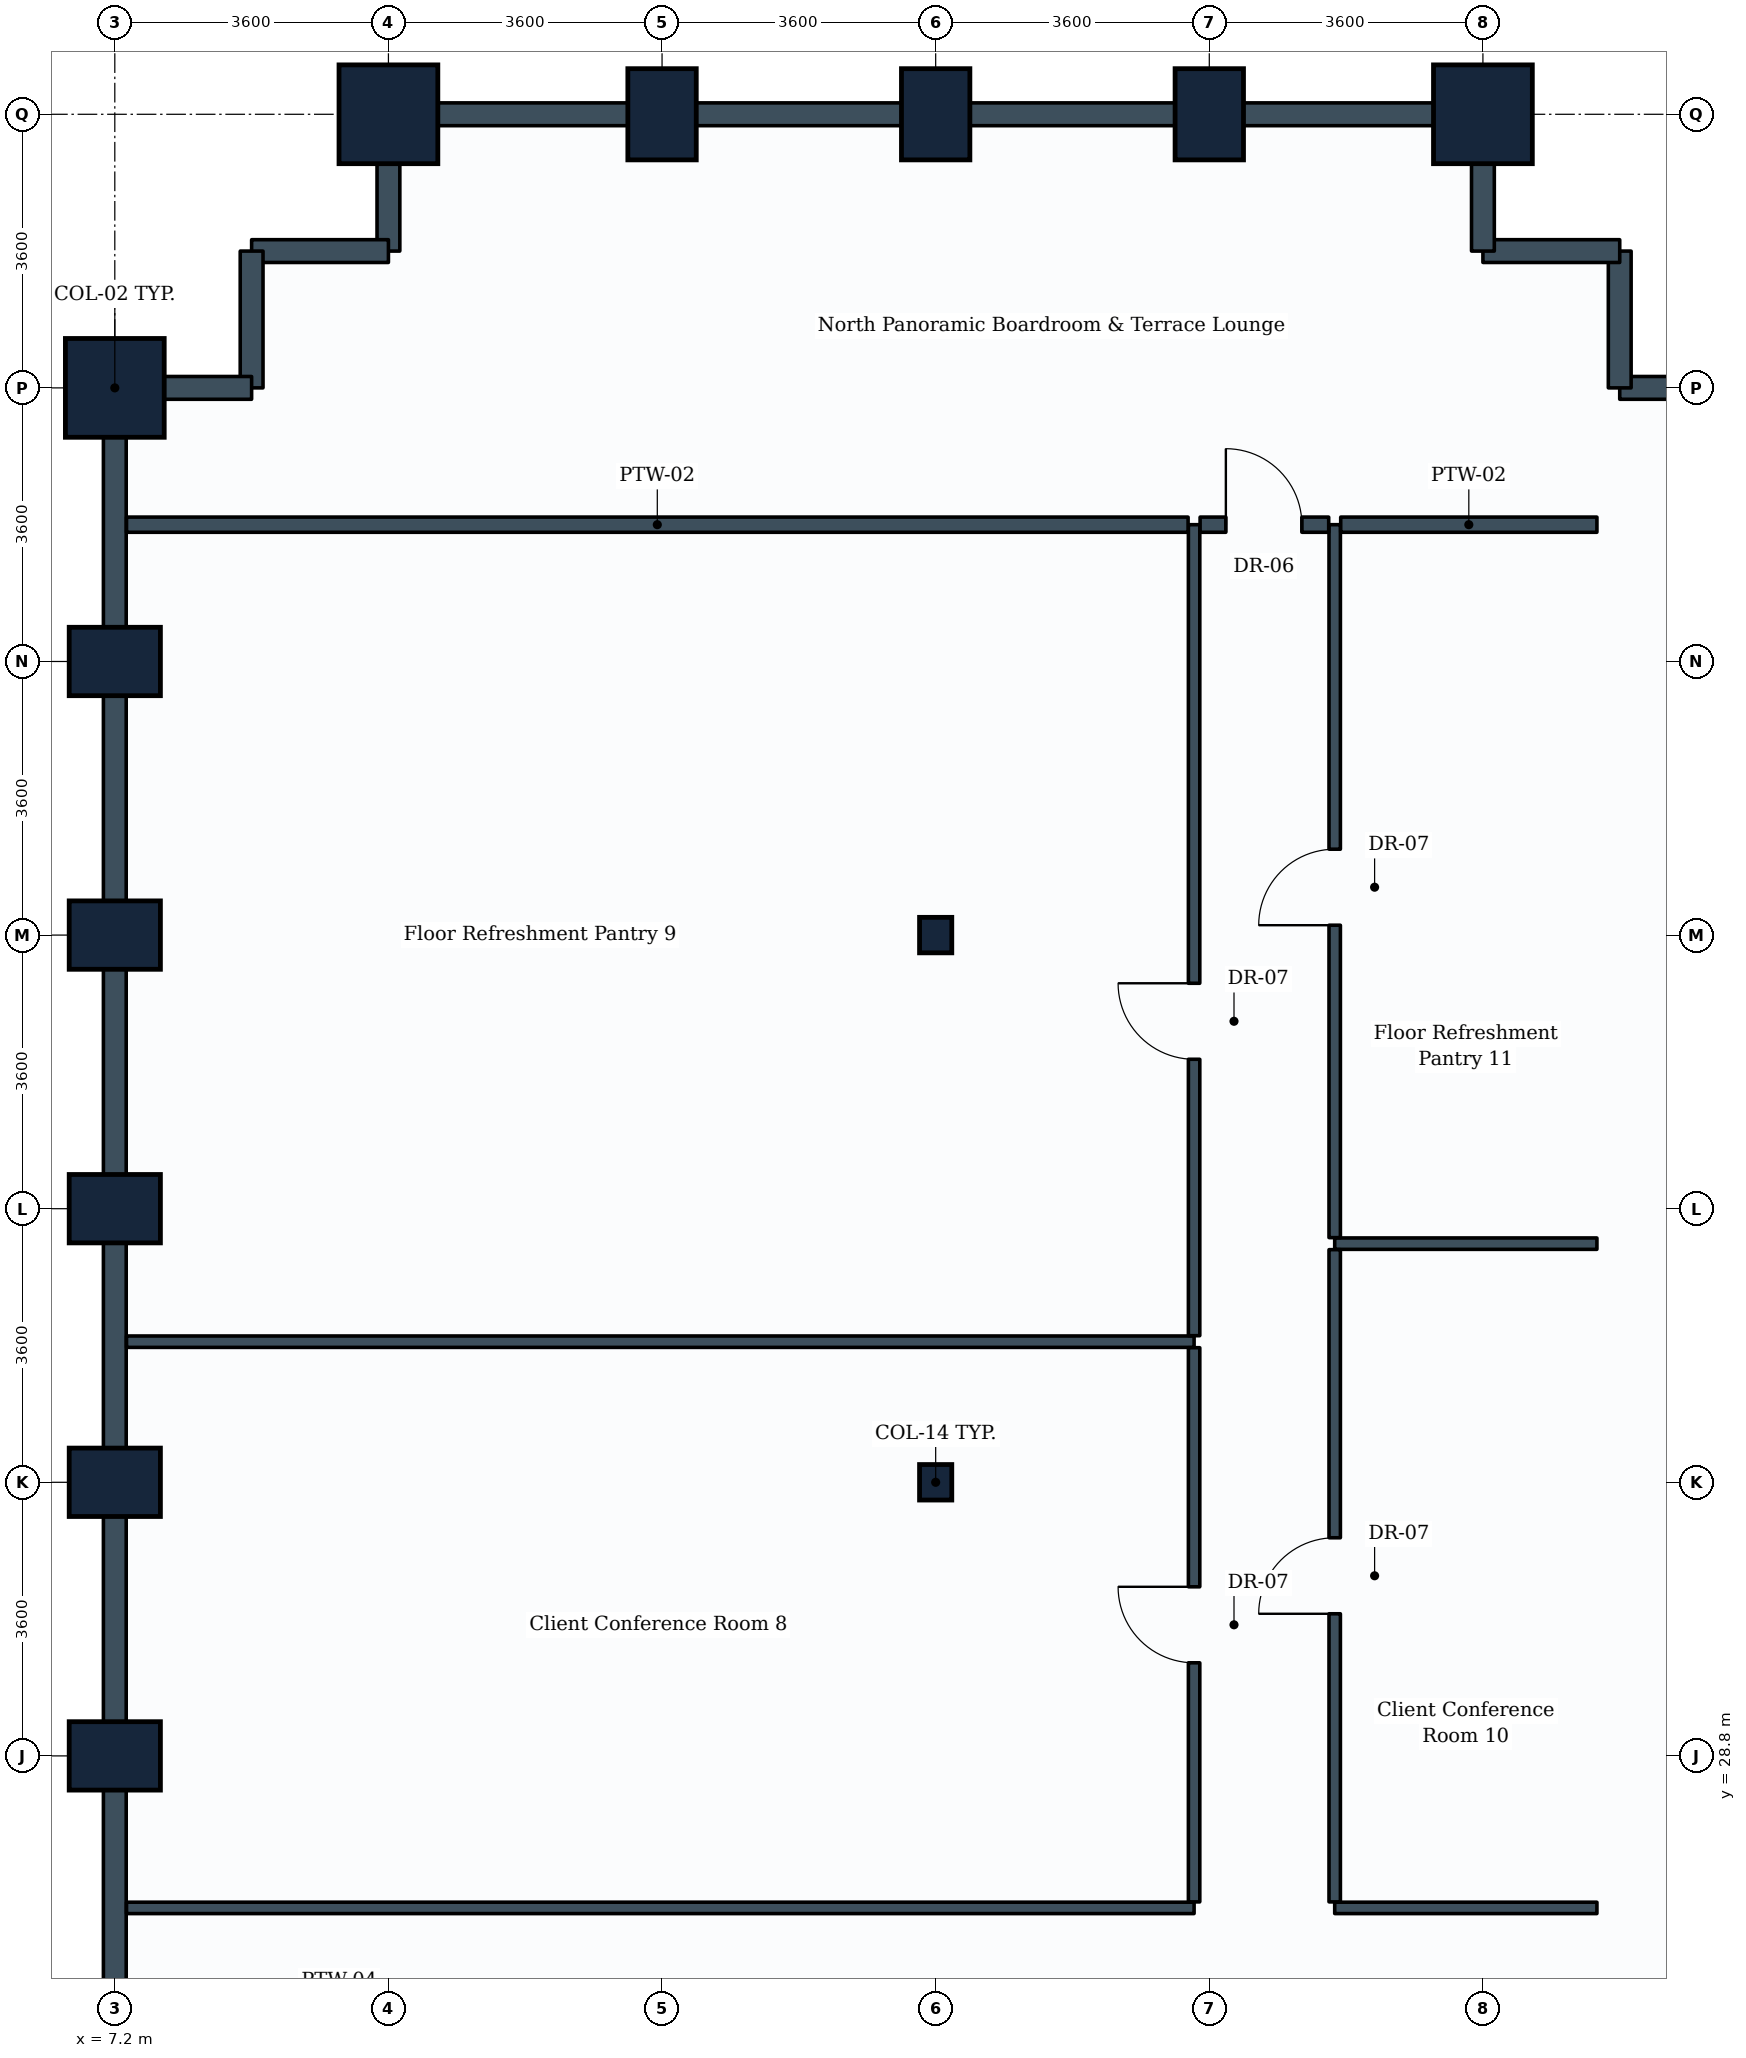
"""IFC4 building model, lengths in metres.
Left out: names, types, materials, properties, quantities, classifications, styles, units other than length and angle.
Written with IfcOpenShell. Run it as: python <this file> out.ifc"""

import sys

from ifc_helpers import new_model, si_unit, direction, frame, frame_2d, origin, origin_2d, place, context, subcontext, project, spatial, rectangle, i_section, extrude, element, fill, save


model = new_model("IFC4")
c1 = context("Model", 3, precision=1e-05, world=origin(), true_north=direction((0.0, 1.0)))
c2 = subcontext(c1, "Body", "Model", "MODEL_VIEW")
j1 = project(units=[si_unit("LENGTHUNIT", "METRE"), si_unit("PLANEANGLEUNIT", "RADIAN")], contexts=[c1])
p1 = place(None, origin())
s1 = spatial("IfcSite", under=j1, at=p1, CompositionType="ELEMENT")
p2 = place(p1, origin())
s2 = spatial("IfcBuilding", under=s1, at=p2, CompositionType="ELEMENT")
p3 = place(p2, frame((0.0, 0.0, 43.5)))
s3 = spatial("IfcBuildingStorey", under=s2, at=p3, CompositionType="ELEMENT", Elevation=43.5)
for number, where, z_axis, x_axis in (
    (1, (7.2, 28.8, 0.0), (0.0, 0.0, 1.0), (0.0, 1.0, 0.0)),
    (2, (7.2, 32.4, 0.0), (0.0, 0.0, 1.0), (0.0, 1.0, 0.0)),
    (3, (7.2, 36.0, 0.0), (0.0, 0.0, 1.0), (0.0, 1.0, 0.0)),
    (4, (7.2, 39.6, 0.0), (0.0, 0.0, 1.0), (0.0, 1.0, 0.0)),
    (5, (7.2, 43.2, 0.0), (0.0, 0.0, 1.0), (0.0, 1.0, 0.0)),
):
    element("IfcColumn", number, at=place(p3, frame(where, z_axis=z_axis, x_axis=x_axis)), inside=s3, PredefinedType="COLUMN", context=c2, shape_type="SweptSolid", body=[
        extrude(rectangle(XDim=0.9, YDim=1.2, at=origin_2d()), origin(), (0.0, 0.0, 1.0), 3.9),
    ])
for number, where, z_axis, x_axis in (
    (6, (7.2, 46.8, 0.0), (0.0, 0.0, 1.0), (0.0, 1.0, 0.0)),
    (7, (10.8, 50.4, 0.0), (0.0, 0.0, 1.0), (1.0, 0.0, 0.0)),
):
    element("IfcColumn", number, at=place(p3, frame(where, z_axis=z_axis, x_axis=x_axis)), inside=s3, PredefinedType="COLUMN", context=c2, shape_type="SweptSolid", body=[
        extrude(rectangle(XDim=1.3, YDim=1.3, at=origin_2d()), origin(), (0.0, 0.0, 1.0), 3.9),
    ])
p4 = place(p3, frame((14.4, 50.4, 0.0), z_axis=(0.0, 0.0, 1.0), x_axis=(1.0, 0.0, 0.0)))
e8 = element("IfcColumn", 8, at=p4, inside=s3, PredefinedType="COLUMN", context=c2, shape_type="SweptSolid", body=[
    extrude(rectangle(XDim=0.9, YDim=1.2, at=origin_2d()), origin(), (0.0, 0.0, 1.0), 3.9),
])
for number, where, z_axis, x_axis in (
    (9, (18.0, 32.4, 0.0), (0.0, 0.0, 1.0), (1.0, 0.0, 0.0)),
    (10, (18.0, 39.6, 0.0), (0.0, 0.0, 1.0), (1.0, 0.0, 0.0)),
):
    element("IfcColumn", number, at=place(p3, frame(where, z_axis=z_axis, x_axis=x_axis)), inside=s3, PredefinedType="COLUMN", context=c2, shape_type="SweptSolid", body=[
        extrude(i_section(OverallWidth=0.424, OverallDepth=0.467, WebThickness=0.033, FlangeThickness=0.053, FilletRadius=0.015, at=origin_2d()), origin(), (0.0, 0.0, 1.0), 3.9),
    ])
for number, where, z_axis, x_axis in (
    (11, (18.0, 50.4, 0.0), (0.0, 0.0, 1.0), (1.0, 0.0, 0.0)),
    (12, (21.6, 50.4, 0.0), (0.0, 0.0, 1.0), (1.0, 0.0, 0.0)),
):
    element("IfcColumn", number, at=place(p3, frame(where, z_axis=z_axis, x_axis=x_axis)), inside=s3, PredefinedType="COLUMN", context=c2, shape_type="SweptSolid", body=[
        extrude(rectangle(XDim=0.9, YDim=1.2, at=origin_2d()), origin(), (0.0, 0.0, 1.0), 3.9),
    ])
p5 = place(p3, frame((25.2, 50.4, 0.0), z_axis=(0.0, 0.0, 1.0), x_axis=(1.0, 0.0, 0.0)))
e13 = element("IfcColumn", 13, at=p5, inside=s3, PredefinedType="COLUMN", context=c2, shape_type="SweptSolid", body=[
    extrude(rectangle(XDim=1.3, YDim=1.3, at=origin_2d()), origin(), (0.0, 0.0, 1.0), 3.9),
])
p6 = place(p3, frame((27.0, 46.8, 0.0), z_axis=(0.0, 0.0, 1.0), x_axis=(1.0, 0.0, 0.0)))
e14 = element("IfcWall", 14, at=p6, inside=s3, PredefinedType="STANDARD", context=c2, shape_type="SweptSolid", body=[
    extrude(rectangle(XDim=1.8, YDim=0.3, at=frame_2d((0.9, 0.0))), origin(), (0.0, 0.0, 1.0), 2.93),
])
for number, where, z_axis, x_axis in (
    (15, (27.0, 46.8, 0.0), (0.0, 0.0, 1.0), (0.0, 1.0, 0.0)),
    (16, (25.2, 48.6, 0.0), (0.0, 0.0, 1.0), (1.0, 0.0, 0.0)),
):
    element("IfcWall", number, at=place(p3, frame(where, z_axis=z_axis, x_axis=x_axis)), inside=s3, PredefinedType="STANDARD", context=c2, shape_type="SweptSolid", body=[
        extrude(rectangle(XDim=1.8, YDim=0.3, at=frame_2d((0.9, 0.0))), origin(), (0.0, 0.0, 1.0), 3.635),
    ])
p7 = place(p3, frame((25.2, 48.6, 0.0), z_axis=(0.0, 0.0, 1.0), x_axis=(0.0, 1.0, 0.0)))
e17 = element("IfcWall", 17, at=p7, inside=s3, PredefinedType="STANDARD", context=c2, shape_type="SweptSolid", body=[
    extrude(rectangle(XDim=1.8, YDim=0.3, at=frame_2d((0.9, 0.0))), origin(), (0.0, 0.0, 1.0), 2.93),
])
p8 = place(p3, frame((21.6, 50.4, 0.0), z_axis=(0.0, 0.0, 1.0), x_axis=(1.0, 0.0, 0.0)))
e18 = element("IfcWall", 18, at=p8, inside=s3, PredefinedType="STANDARD", context=c2, shape_type="SweptSolid", body=[
    extrude(rectangle(XDim=3.6, YDim=0.3, at=frame_2d((1.8, 0.0))), origin(), (0.0, 0.0, 1.0), 2.93),
])
for number, where, z_axis, x_axis in (
    (19, (18.0, 50.4, 0.0), (0.0, 0.0, 1.0), (1.0, 0.0, 0.0)),
    (20, (14.4, 50.4, 0.0), (0.0, 0.0, 1.0), (1.0, 0.0, 0.0)),
):
    element("IfcWall", number, at=place(p3, frame(where, z_axis=z_axis, x_axis=x_axis)), inside=s3, PredefinedType="STANDARD", context=c2, shape_type="SweptSolid", body=[
        extrude(rectangle(XDim=3.6, YDim=0.3, at=frame_2d((1.8, 0.0))), origin(), (0.0, 0.0, 1.0), 2.93),
    ])
p9 = place(p3, frame((10.8, 50.4, 0.0), z_axis=(0.0, 0.0, 1.0), x_axis=(1.0, 0.0, 0.0)))
e21 = element("IfcWall", 21, at=p9, inside=s3, PredefinedType="STANDARD", context=c2, shape_type="SweptSolid", body=[
    extrude(rectangle(XDim=3.6, YDim=0.3, at=frame_2d((1.8, 0.0))), origin(), (0.0, 0.0, 1.0), 2.93),
])
p10 = place(p3, frame((10.8, 48.6, 0.0), z_axis=(0.0, 0.0, 1.0), x_axis=(0.0, 1.0, 0.0)))
e22 = element("IfcWall", 22, at=p10, inside=s3, PredefinedType="STANDARD", context=c2, shape_type="SweptSolid", body=[
    extrude(rectangle(XDim=1.8, YDim=0.3, at=frame_2d((0.9, 0.0))), origin(), (0.0, 0.0, 1.0), 2.93),
])
for number, where, z_axis, x_axis in (
    (23, (9.0, 48.6, 0.0), (0.0, 0.0, 1.0), (1.0, 0.0, 0.0)),
    (24, (9.0, 46.8, 0.0), (0.0, 0.0, 1.0), (0.0, 1.0, 0.0)),
):
    element("IfcWall", number, at=place(p3, frame(where, z_axis=z_axis, x_axis=x_axis)), inside=s3, PredefinedType="STANDARD", context=c2, shape_type="SweptSolid", body=[
        extrude(rectangle(XDim=1.8, YDim=0.3, at=frame_2d((0.9, 0.0))), origin(), (0.0, 0.0, 1.0), 3.635),
    ])
p11 = place(p3, frame((7.2, 46.8, 0.0), z_axis=(0.0, 0.0, 1.0), x_axis=(1.0, 0.0, 0.0)))
e25 = element("IfcWall", 25, at=p11, inside=s3, PredefinedType="STANDARD", context=c2, shape_type="SweptSolid", body=[
    extrude(rectangle(XDim=1.8, YDim=0.3, at=frame_2d((0.9, 0.0))), origin(), (0.0, 0.0, 1.0), 2.93),
])
p12 = place(p3, frame((7.2, 43.2, 0.0), z_axis=(0.0, 0.0, 1.0), x_axis=(0.0, 1.0, 0.0)))
e26 = element("IfcWall", 26, at=p12, inside=s3, PredefinedType="STANDARD", context=c2, shape_type="SweptSolid", body=[
    extrude(rectangle(XDim=3.6, YDim=0.3, at=frame_2d((1.8, 0.0))), origin(), (0.0, 0.0, 1.0), 2.93),
])
p13 = place(p3, frame((7.2, 39.6, 0.0), z_axis=(0.0, 0.0, 1.0), x_axis=(0.0, 1.0, 0.0)))
e27 = element("IfcWall", 27, at=p13, inside=s3, PredefinedType="STANDARD", context=c2, shape_type="SweptSolid", body=[
    extrude(rectangle(XDim=3.6, YDim=0.3, at=frame_2d((1.8, 0.0))), origin(), (0.0, 0.0, 1.0), 2.93),
])
for number, where, z_axis, x_axis in (
    (28, (7.2, 36.0, 0.0), (0.0, 0.0, 1.0), (0.0, 1.0, 0.0)),
    (29, (7.2, 32.4, 0.0), (0.0, 0.0, 1.0), (0.0, 1.0, 0.0)),
):
    element("IfcWall", number, at=place(p3, frame(where, z_axis=z_axis, x_axis=x_axis)), inside=s3, PredefinedType="STANDARD", context=c2, shape_type="SweptSolid", body=[
        extrude(rectangle(XDim=3.6, YDim=0.3, at=frame_2d((1.8, 0.0))), origin(), (0.0, 0.0, 1.0), 2.93),
    ])
p14 = place(p3, frame((7.2, 28.8, 0.0), z_axis=(0.0, 0.0, 1.0), x_axis=(0.0, 1.0, 0.0)))
e30 = element("IfcWall", 30, at=p14, inside=s3, PredefinedType="STANDARD", context=c2, shape_type="SweptSolid", body=[
    extrude(rectangle(XDim=3.6, YDim=0.3, at=frame_2d((1.8, 0.0))), origin(), (0.0, 0.0, 1.0), 2.93),
])
p15 = place(p3, frame((7.2, 25.2, 0.0), z_axis=(0.0, 0.0, 1.0), x_axis=(0.0, 1.0, 0.0)))
e31 = element("IfcWall", 31, at=p15, inside=s3, PredefinedType="STANDARD", context=c2, shape_type="SweptSolid", body=[
    extrude(rectangle(XDim=3.6, YDim=0.3, at=frame_2d((1.8, 0.0))), origin(), (0.0, 0.0, 1.0), 2.93),
])
for number, where, z_axis, x_axis in (
    (32, (7.354, 26.8, 0.0), (0.0, 0.0, 1.0), (1.0, 0.0, 0.0)),
    (33, (7.354, 34.25, 0.0), (0.0, 0.0, 1.0), (1.0, 0.0, 0.0)),
):
    element("IfcWall", number, at=place(p3, frame(where, z_axis=z_axis, x_axis=x_axis)), inside=s3, PredefinedType="PARTITIONING", context=c2, shape_type="SweptSolid", body=[
        extrude(rectangle(XDim=14.046, YDim=0.15, at=frame_2d((7.023, 0.0))), origin(), (0.0, 0.0, 1.0), 2.93),
    ])
p16 = place(p3, frame((21.4, 26.879, 0.0), z_axis=(0.0, 0.0, 1.0), x_axis=(0.0, 1.0, 0.0)))
e34 = element("IfcWall", 34, at=p16, inside=s3, PredefinedType="PARTITIONING", context=c2, shape_type="SweptSolid", body=[
    extrude(rectangle(XDim=7.292, YDim=0.15, at=frame_2d((3.646, 0.0))), origin(), (0.0, 0.0, 1.0), 3.08),
])
p17 = place(p16, frame((3.146, 0.0, 0.0)))
e35 = element("IfcOpeningElement", 35, at=p17, cuts=e34, PredefinedType="OPENING", context=c2, shape_type="SweptSolid", body=[
    extrude(rectangle(XDim=1.0, YDim=2.1, at=frame_2d((0.5, 1.05))), frame((0.0, 0.085, 0.0), z_axis=(0.0, -1.0, 0.0), x_axis=(1.0, 0.0, 0.0)), (0.0, 0.0, 1.0), 0.17),
])
p18 = place(p3, frame((21.4, 34.329, 0.0), z_axis=(0.0, 0.0, 1.0), x_axis=(0.0, 1.0, 0.0)))
e36 = element("IfcWall", 36, at=p18, inside=s3, PredefinedType="PARTITIONING", context=c2, shape_type="SweptSolid", body=[
    extrude(rectangle(XDim=10.671, YDim=0.15, at=frame_2d((5.335, 0.0))), origin(), (0.0, 0.0, 1.0), 3.03),
])
p19 = place(p18, frame((3.637, 0.0, 0.0)))
e37 = element("IfcOpeningElement", 37, at=p19, cuts=e36, PredefinedType="OPENING", context=c2, shape_type="SweptSolid", body=[
    extrude(rectangle(XDim=1.0, YDim=2.1, at=frame_2d((0.5, 1.05))), frame((0.0, 0.085, 0.0), z_axis=(0.0, -1.0, 0.0), x_axis=(1.0, 0.0, 0.0)), (0.0, 0.0, 1.0), 0.17),
])
p20 = place(p3, frame((23.25, 26.8, 0.0), z_axis=(0.0, 0.0, 1.0), x_axis=(1.0, 0.0, 0.0)))
e38 = element("IfcWall", 38, at=p20, inside=s3, PredefinedType="PARTITIONING", context=c2, shape_type="SweptSolid", body=[
    extrude(rectangle(XDim=3.45, YDim=0.15, at=frame_2d((1.725, 0.0))), origin(), (0.0, 0.0, 1.0), 3.635),
])
p21 = place(p3, frame((23.25, 35.54, 0.0), z_axis=(0.0, 0.0, 1.0), x_axis=(1.0, 0.0, 0.0)))
e39 = element("IfcWall", 39, at=p21, inside=s3, PredefinedType="PARTITIONING", context=c2, shape_type="SweptSolid", body=[
    extrude(rectangle(XDim=3.45, YDim=0.15, at=frame_2d((1.725, 0.0))), origin(), (0.0, 0.0, 1.0), 3.03),
])
p22 = place(p3, frame((23.25, 26.879, 0.0), z_axis=(0.0, 0.0, 1.0), x_axis=(0.0, 1.0, 0.0)))
e40 = element("IfcWall", 40, at=p22, inside=s3, PredefinedType="PARTITIONING", context=c2, shape_type="SweptSolid", body=[
    extrude(rectangle(XDim=8.582, YDim=0.15, at=frame_2d((4.291, 0.0))), origin(), (0.0, 0.0, 1.0), 3.08),
])
p23 = place(p22, frame((3.791, 0.0, 0.0)))
e41 = element("IfcOpeningElement", 41, at=p23, cuts=e40, PredefinedType="OPENING", context=c2, shape_type="SweptSolid", body=[
    extrude(rectangle(XDim=1.0, YDim=2.1, at=frame_2d((0.5, 1.05))), frame((0.0, 0.085, 0.0), z_axis=(0.0, -1.0, 0.0), x_axis=(1.0, 0.0, 0.0)), (0.0, 0.0, 1.0), 0.17),
])
p24 = place(p3, frame((23.25, 35.619, 0.0), z_axis=(0.0, 0.0, 1.0), x_axis=(0.0, 1.0, 0.0)))
e42 = element("IfcWall", 42, at=p24, inside=s3, PredefinedType="PARTITIONING", context=c2, shape_type="SweptSolid", body=[
    extrude(rectangle(XDim=9.381, YDim=0.15, at=frame_2d((4.69, 0.0))), origin(), (0.0, 0.0, 1.0), 3.08),
])
p25 = place(p24, frame((4.111, 0.0, 0.0)))
e43 = element("IfcOpeningElement", 43, at=p25, cuts=e42, PredefinedType="OPENING", context=c2, shape_type="SweptSolid", body=[
    extrude(rectangle(XDim=1.0, YDim=2.1, at=frame_2d((0.5, 1.05))), frame((0.0, 0.085, 0.0), z_axis=(0.0, -1.0, 0.0), x_axis=(1.0, 0.0, 0.0)), (0.0, 0.0, 1.0), 0.17),
])
p26 = place(p3, frame((7.354, 45.0, 0.0), z_axis=(0.0, 0.0, 1.0), x_axis=(1.0, 0.0, 0.0)))
e44 = element("IfcWall", 44, at=p26, inside=s3, PredefinedType="PARTITIONING", context=c2, shape_type="SweptSolid", body=[
    extrude(rectangle(XDim=13.967, YDim=0.2, at=frame_2d((6.983, 0.0))), origin(), (0.0, 0.0, 1.0), 2.93),
])
p27 = place(p3, frame((23.329, 45.0, 0.0), z_axis=(0.0, 0.0, 1.0), x_axis=(1.0, 0.0, 0.0)))
e45 = element("IfcWall", 45, at=p27, inside=s3, PredefinedType="PARTITIONING", context=c2, shape_type="SweptSolid", body=[
    extrude(rectangle(XDim=3.371, YDim=0.2, at=frame_2d((1.686, 0.0))), origin(), (0.0, 0.0, 1.0), 3.635),
])
p28 = place(p3, frame((21.479, 45.0, 0.0), z_axis=(0.0, 0.0, 1.0), x_axis=(1.0, 0.0, 0.0)))
e46 = element("IfcWall", 46, at=p28, inside=s3, PredefinedType="PARTITIONING", context=c2, shape_type="SweptSolid", body=[
    extrude(rectangle(XDim=1.692, YDim=0.2, at=frame_2d((0.846, 0.0))), origin(), (0.0, 0.0, 1.0), 3.635),
])
p29 = place(p28, frame((0.339, 0.0, 0.0)))
e47 = element("IfcOpeningElement", 47, at=p29, cuts=e46, PredefinedType="OPENING", context=c2, shape_type="SweptSolid", body=[
    extrude(rectangle(XDim=1.0, YDim=2.1, at=frame_2d((0.5, 1.05))), frame((0.0, 0.11, 0.0), z_axis=(0.0, -1.0, 0.0), x_axis=(1.0, 0.0, 0.0)), (0.0, 0.0, 1.0), 0.22),
])
p30 = place(p17, origin())
e48 = element("IfcDoor", 48, at=p30, inside=s3, OperationType="SINGLE_SWING_RIGHT", PredefinedType="DOOR", context=c2, shape_type="SweptSolid", body=[
    extrude(rectangle(XDim=1.0, YDim=2.1, at=frame_2d((0.5, 1.05))), frame((0.0, 0.025, 0.0), z_axis=(0.0, -1.0, 0.0), x_axis=(1.0, 0.0, 0.0)), (0.0, 0.0, 1.0), 0.05),
])
fill(e35, e48)
p31 = place(p19, origin())
e49 = element("IfcDoor", 49, at=p31, inside=s3, OperationType="SINGLE_SWING_RIGHT", PredefinedType="DOOR", context=c2, shape_type="SweptSolid", body=[
    extrude(rectangle(XDim=1.0, YDim=2.1, at=frame_2d((0.5, 1.05))), frame((0.0, 0.025, 0.0), z_axis=(0.0, -1.0, 0.0), x_axis=(1.0, 0.0, 0.0)), (0.0, 0.0, 1.0), 0.05),
])
fill(e37, e49)
p32 = place(p23, origin())
e50 = element("IfcDoor", 50, at=p32, inside=s3, OperationType="SINGLE_SWING_LEFT", PredefinedType="DOOR", context=c2, shape_type="SweptSolid", body=[
    extrude(rectangle(XDim=1.0, YDim=2.1, at=frame_2d((0.5, 1.05))), frame((0.0, 0.025, 0.0), z_axis=(0.0, -1.0, 0.0), x_axis=(1.0, 0.0, 0.0)), (0.0, 0.0, 1.0), 0.05),
])
fill(e41, e50)
p33 = place(p25, origin())
e51 = element("IfcDoor", 51, at=p33, inside=s3, OperationType="SINGLE_SWING_LEFT", PredefinedType="DOOR", context=c2, shape_type="SweptSolid", body=[
    extrude(rectangle(XDim=1.0, YDim=2.1, at=frame_2d((0.5, 1.05))), frame((0.0, 0.025, 0.0), z_axis=(0.0, -1.0, 0.0), x_axis=(1.0, 0.0, 0.0)), (0.0, 0.0, 1.0), 0.05),
])
fill(e43, e51)
p34 = place(p29, origin())
e52 = element("IfcDoor", 52, at=p34, inside=s3, OperationType="SINGLE_SWING_LEFT", PredefinedType="DOOR", context=c2, shape_type="SweptSolid", body=[
    extrude(rectangle(XDim=1.0, YDim=2.1, at=frame_2d((0.5, 1.05))), frame((0.0, 0.025, 0.0), z_axis=(0.0, -1.0, 0.0), x_axis=(1.0, 0.0, 0.0)), (0.0, 0.0, 1.0), 0.05),
])
fill(e47, e52)
save(model, sys.argv[1])
